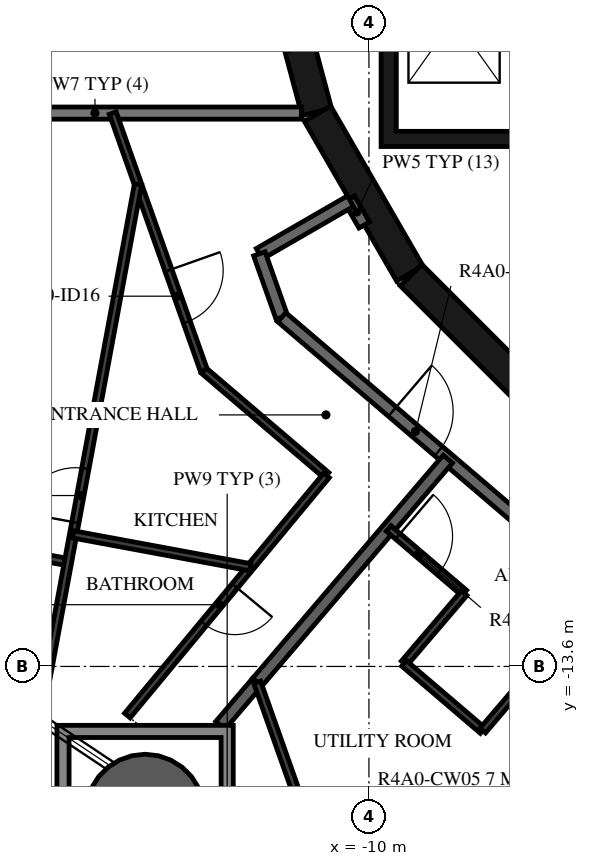
"""IFC4 building model, lengths in metres.
Left out: names, types, materials, properties, quantities, classifications, styles, units other than length and angle.
Written with IfcOpenShell. Run it as: python <this file> out.ifc"""

import sys

from ifc_helpers import new_model, si_unit, direction, frame, frame_2d, origin, origin_2d, place, context, subcontext, project, spatial, polyline, rectangle, hollow_circle, outline, extrude, element, fill, save


model = new_model("IFC4")
c1 = context("Model", 3, precision=1e-05, world=origin(), true_north=direction((0.0, 1.0)))
c2 = subcontext(c1, "Body", "Model", "MODEL_VIEW")
j1 = project(units=[si_unit("LENGTHUNIT", "METRE"), si_unit("PLANEANGLEUNIT", "RADIAN")], contexts=[c1])
p1 = place(None, origin())
s1 = spatial("IfcSite", under=j1, at=p1, CompositionType="ELEMENT")
p2 = place(p1, origin())
s2 = spatial("IfcBuilding", under=s1, at=p2, CompositionType="ELEMENT")
p3 = place(p2, frame((0.0, 0.0, 158.7)))
s3 = spatial("IfcBuildingStorey", under=s2, at=p3, CompositionType="ELEMENT", Elevation=158.7)
p4 = place(p3, frame((-13.681, -16.019, -0.38), z_axis=(0.0, 0.0, 1.0), x_axis=(1.0, 0.0, 0.0)))
e1 = element("IfcColumn", 1, at=p4, inside=s3, PredefinedType="COLUMN", context=c2, shape_type="SweptSolid", body=[
    extrude(hollow_circle(Radius=0.975, WallThickness=0.045, at=origin_2d()), origin(), (0.0, 0.0, 1.0), 3.5),
])
p5 = place(p3, frame((-11.643, -1.55, 0.0), z_axis=(0.0, 0.0, 1.0), x_axis=(0.258734743916, -0.965948410781, 0.0)))
e2 = element("IfcWall", 2, at=p5, inside=s3, PredefinedType="SHEAR", context=c2, shape_type="SweptSolid", body=[
    extrude(rectangle(XDim=3.033, YDim=0.5, at=frame_2d((1.516, 0.0))), origin(), (0.0, 0.0, 1.0), 3.12),
])
p6 = place(p5, frame((1.066, 0.0, 0.0)))
e3 = element("IfcOpeningElement", 3, at=p6, cuts=e2, PredefinedType="OPENING", context=c2, shape_type="SweptSolid", body=[
    extrude(rectangle(XDim=0.9, YDim=2.1, at=frame_2d((0.45, 1.05))), frame((0.0, 0.26, 0.0), z_axis=(0.0, -1.0, 0.0), x_axis=(1.0, 0.0, 0.0)), (0.0, 0.0, 1.0), 0.52),
])
p7 = place(p3, frame((-10.845, -4.51, 0.0), z_axis=(0.0, 0.0, 1.0), x_axis=(0.500087131594, -0.865975092491, 0.0)))
e4 = element("IfcWall", 4, at=p7, inside=s3, PredefinedType="SHEAR", context=c2, shape_type="SweptSolid", body=[
    extrude(rectangle(XDim=3.033, YDim=0.5, at=frame_2d((1.516, 0.0))), origin(), (0.0, 0.0, 1.0), 3.12),
])
p8 = place(p3, frame((-9.308, -7.164, 0.0), z_axis=(0.0, 0.0, 1.0), x_axis=(0.707106781187, -0.707106781187, 0.0)))
e5 = element("IfcWall", 5, at=p8, inside=s3, PredefinedType="SHEAR", context=c2, shape_type="SweptSolid", body=[
    extrude(rectangle(XDim=3.032, YDim=0.5, at=frame_2d((1.516, 0.0))), origin(), (0.0, 0.0, 1.0), 3.12),
])
p9 = place(p3, origin())
e6 = element("IfcWall", 6, at=p9, inside=s3, PredefinedType="SHEAR", context=c2, shape_type="SweptSolid", body=[
    extrude(outline(polyline([(9.8, -5.05), (9.8, -4.8), (9.8, -1.9), (9.55, -1.9), (9.55, -4.8), (7.65, -4.8), (7.65, -1.9), (7.4, -1.9), (7.4, -4.8), (5.5, -4.8), (5.5, -1.9), (5.25, -1.9), (5.25, -4.8), (3.35, -4.8), (3.35, -1.9), (3.1, -1.9), (3.1, -4.8), (1.2, -4.8), (1.2, -1.9), (0.95, -1.9), (0.95, -4.8), (-0.95, -4.8), (-0.95, -1.9), (-1.2, -1.9), (-1.2, -4.8), (-3.1, -4.8), (-3.1, -1.9), (-3.35, -1.9), (-3.35, -4.8), (-5.25, -4.8), (-5.25, -1.9), (-5.5, -1.9), (-5.5, -4.8), (-7.4, -4.8), (-7.4, -1.9), (-7.65, -1.9), (-7.65, -4.8), (-9.55, -4.8), (-9.55, -1.9), (-9.8, -1.9), (-9.8, -4.8), (-9.8, -5.05), (9.8, -5.05)])), origin(), (0.0, 0.0, 1.0), 3.12),
])
p10 = place(p3, frame((-10.323, -5.914, 0.0), z_axis=(0.0, 0.0, 1.0), x_axis=(0.500137201729, -0.865946175837, 0.0)))
e7 = element("IfcWall", 7, at=p10, inside=s3, PredefinedType="STANDARD", context=c2, shape_type="SweptSolid", body=[
    extrude(rectangle(XDim=0.492, YDim=0.2, at=frame_2d((0.246, 0.0))), origin(), (0.0, 0.0, 1.0), 3.12),
])
p11 = place(p3, frame((-10.303, -5.949, 0.0), z_axis=(0.0, 0.0, 1.0), x_axis=(-0.866021168401, -0.500007335828, 0.0)))
e8 = element("IfcWall", 8, at=p11, inside=s3, PredefinedType="STANDARD", context=c2, shape_type="SweptSolid", body=[
    extrude(rectangle(XDim=1.731, YDim=0.2, at=frame_2d((0.865, 0.0))), origin(), (0.0, 0.0, 1.0), 3.12),
])
p12 = place(p3, frame((-11.802, -6.814, 0.0), z_axis=(0.0, 0.0, 1.0), x_axis=(0.333904297771, -0.942606980629, 0.0)))
e9 = element("IfcWall", 9, at=p12, inside=s3, PredefinedType="STANDARD", context=c2, shape_type="SweptSolid", body=[
    extrude(rectangle(XDim=1.107, YDim=0.2, at=frame_2d((0.553, 0.0))), origin(), (0.0, 0.0, 1.0), 3.12),
])
p13 = place(p3, frame((-11.433, -7.858, 0.0), z_axis=(0.0, 0.0, 1.0), x_axis=(0.760412154545, -0.649440801937, 0.0)))
e10 = element("IfcWall", 10, at=p13, inside=s3, PredefinedType="STANDARD", context=c2, shape_type="SweptSolid", body=[
    extrude(rectangle(XDim=7.181, YDim=0.2, at=frame_2d((3.59, 0.0))), origin(), (0.0, 0.0, 1.0), 3.12),
])
p14 = place(p13, frame((2.39, 0.0, 0.0)))
e11 = element("IfcOpeningElement", 11, at=p14, cuts=e10, PredefinedType="OPENING", context=c2, shape_type="SweptSolid", body=[
    extrude(rectangle(XDim=1.0, YDim=2.1, at=frame_2d((0.5, 1.05))), frame((0.0, 0.11, 0.0), z_axis=(0.0, -1.0, 0.0), x_axis=(1.0, 0.0, 0.0)), (0.0, 0.0, 1.0), 0.22),
])
p15 = place(p3, frame((-17.9, -4.5, 0.0), z_axis=(0.0, 0.0, 1.0), x_axis=(1.0, 0.0, 0.0)))
e12 = element("IfcWall", 12, at=p15, inside=s3, PredefinedType="STANDARD", context=c2, shape_type="SweptSolid", body=[
    extrude(rectangle(XDim=6.789, YDim=0.2, at=frame_2d((3.394, 0.0))), origin(), (0.0, 0.0, 1.0), 3.12),
])
p16 = place(p3, frame((-11.838, -13.86, 0.0), z_axis=(0.0, 0.0, 1.0), x_axis=(0.64944503311, 0.760408540831, 0.0)))
e13 = element("IfcWall", 13, at=p16, inside=s3, PredefinedType="STANDARD", context=c2, shape_type="SweptSolid", body=[
    extrude(rectangle(XDim=4.827, YDim=0.2, at=frame_2d((2.414, 0.0))), origin(), (0.0, 0.0, 1.0), 3.12),
])
p17 = place(p3, frame((-12.443, -14.569, 0.0), z_axis=(0.0, 0.0, 1.0), x_axis=(0.649517408851, 0.760346720648, 0.0)))
e14 = element("IfcWall", 14, at=p17, inside=s3, PredefinedType="STANDARD", context=c2, shape_type="SweptSolid", body=[
    extrude(rectangle(XDim=0.932, YDim=0.2, at=frame_2d((0.466, 0.0))), origin(), (0.0, 0.0, 1.0), 3.12),
])
p18 = place(p3, frame((-14.213, -4.5, 0.0), z_axis=(0.0, 0.0, 1.0), x_axis=(0.333802904542, -0.942642891513, 0.0)))
e15 = element("IfcWall", 15, at=p18, inside=s3, PredefinedType="PARTITIONING", context=c2, shape_type="SweptSolid", body=[
    extrude(rectangle(XDim=4.495, YDim=0.12, at=frame_2d((2.248, 0.0))), origin(), (0.0, 0.0, 1.0), 3.12),
])
p19 = place(p18, frame((2.744, 0.0, 0.0)))
e16 = element("IfcOpeningElement", 16, at=p19, cuts=e15, PredefinedType="OPENING", context=c2, shape_type="SweptSolid", body=[
    extrude(rectangle(XDim=0.9, YDim=2.1, at=frame_2d((0.45, 1.05))), frame((0.0, 0.07, 0.0), z_axis=(0.0, -1.0, 0.0), x_axis=(1.0, 0.0, 0.0)), (0.0, 0.0, 1.0), 0.14),
])
p20 = place(p3, frame((-12.713, -8.737, 0.0), z_axis=(0.0, 0.0, 1.0), x_axis=(0.760400223405, -0.649454771517, 0.0)))
e17 = element("IfcWall", 17, at=p20, inside=s3, PredefinedType="PARTITIONING", context=c2, shape_type="SweptSolid", body=[
    extrude(rectangle(XDim=2.649, YDim=0.12, at=frame_2d((1.325, 0.0))), origin(), (0.0, 0.0, 1.0), 3.12),
])
p21 = place(p3, frame((-10.698, -10.458, 0.0), z_axis=(0.0, 0.0, 1.0), x_axis=(-0.63830561059, -0.769783052223, 0.0)))
e18 = element("IfcWall", 18, at=p21, inside=s3, PredefinedType="PARTITIONING", context=c2, shape_type="SweptSolid", body=[
    extrude(rectangle(XDim=5.131, YDim=0.12, at=frame_2d((2.565, 0.0))), origin(), (0.0, 0.0, 1.0), 3.12),
])
p22 = place(p21, frame((2.363, 0.0, 0.0)))
e19 = element("IfcOpeningElement", 19, at=p22, cuts=e18, PredefinedType="OPENING", context=c2, shape_type="SweptSolid", body=[
    extrude(rectangle(XDim=0.8, YDim=2.1, at=frame_2d((0.4, 1.05))), frame((0.0, 0.07, 0.0), z_axis=(0.0, -1.0, 0.0), x_axis=(1.0, 0.0, 0.0)), (0.0, 0.0, 1.0), 0.14),
])
p23 = place(p3, frame((-20.849, -10.792, 0.0), z_axis=(0.0, 0.0, 1.0), x_axis=(0.983251500113, -0.182253909494, 0.0)))
e20 = element("IfcWall", 20, at=p23, inside=s3, PredefinedType="PARTITIONING", context=c2, shape_type="SweptSolid", body=[
    extrude(rectangle(XDim=6.0, YDim=0.12, at=frame_2d((3.0, 0.0))), origin(), (0.0, 0.0, 1.0), 2.73),
])
p24 = place(p23, frame((0.2, 0.0, 0.0)))
e21 = element("IfcOpeningElement", 21, at=p24, cuts=e20, PredefinedType="OPENING", context=c2, shape_type="SweptSolid", body=[
    extrude(rectangle(XDim=0.9, YDim=2.1, at=frame_2d((0.45, 1.05))), frame((0.0, 0.07, 0.0), z_axis=(0.0, -1.0, 0.0), x_axis=(1.0, 0.0, 0.0)), (0.0, 0.0, 1.0), 0.14),
])
p25 = place(p3, frame((-15.554, -15.149, 0.0), z_axis=(0.0, 0.0, 1.0), x_axis=(0.182237116667, 0.983254612656, 0.0)))
e22 = element("IfcWall", 22, at=p25, inside=s3, PredefinedType="PARTITIONING", context=c2, shape_type="SweptSolid", body=[
    extrude(rectangle(XDim=9.638, YDim=0.12, at=frame_2d((4.819, 0.0))), origin(), (0.0, 0.0, 1.0), 3.12),
])
p26 = place(p25, frame((3.984, 0.0, 0.0)))
e23 = element("IfcOpeningElement", 23, at=p26, cuts=e22, PredefinedType="OPENING", context=c2, shape_type="SweptSolid", body=[
    extrude(rectangle(XDim=0.9, YDim=2.1, at=frame_2d((0.45, 1.05))), frame((0.0, 0.07, 0.0), z_axis=(0.0, -1.0, 0.0), x_axis=(1.0, 0.0, 0.0)), (0.0, 0.0, 1.0), 0.14),
])
p27 = place(p3, frame((-14.865, -11.428, 0.0), z_axis=(0.0, 0.0, 1.0), x_axis=(0.983255224962, -0.182233812955, 0.0)))
e24 = element("IfcWall", 24, at=p27, inside=s3, PredefinedType="PARTITIONING", context=c2, shape_type="SweptSolid", body=[
    extrude(rectangle(XDim=2.963, YDim=0.12, at=frame_2d((1.482, 0.0))), origin(), (0.0, 0.0, 1.0), 3.12),
])
p28 = place(p3, frame((-9.677, -11.33, 0.0), z_axis=(0.0, 0.0, 1.0), x_axis=(0.760372142735, -0.649487647729, 0.0)))
e25 = element("IfcWall", 25, at=p28, inside=s3, PredefinedType="PARTITIONING", context=c2, shape_type="SweptSolid", body=[
    extrude(rectangle(XDim=1.636, YDim=0.12, at=frame_2d((0.818, 0.0))), origin(), (0.0, 0.0, 1.0), 3.12),
])
p29 = place(p28, frame((0.2, 0.0, 0.0)))
e26 = element("IfcOpeningElement", 26, at=p29, cuts=e25, PredefinedType="OPENING", context=c2, shape_type="SweptSolid", body=[
    extrude(rectangle(XDim=0.9, YDim=2.1, at=frame_2d((0.45, 1.05))), frame((0.0, 0.07, 0.0), z_axis=(0.0, -1.0, 0.0), x_axis=(1.0, 0.0, 0.0)), (0.0, 0.0, 1.0), 0.14),
])
p30 = place(p3, frame((-8.433, -12.393, 0.0), z_axis=(0.0, 0.0, 1.0), x_axis=(-0.649443355674, -0.760409973482, 0.0)))
e27 = element("IfcWall", 27, at=p30, inside=s3, PredefinedType="PARTITIONING", context=c2, shape_type="SweptSolid", body=[
    extrude(rectangle(XDim=1.522, YDim=0.12, at=frame_2d((0.761, 0.0))), origin(), (0.0, 0.0, 1.0), 3.12),
])
p31 = place(p3, frame((-9.422, -13.55, 0.0), z_axis=(0.0, 0.0, 1.0), x_axis=(0.760431300628, -0.649418383652, 0.0)))
e28 = element("IfcWall", 28, at=p31, inside=s3, PredefinedType="PARTITIONING", context=c2, shape_type="SweptSolid", body=[
    extrude(rectangle(XDim=1.7, YDim=0.12, at=frame_2d((0.85, 0.0))), origin(), (0.0, 0.0, 1.0), 3.12),
])
p32 = place(p3, frame((-8.129, -14.654, 0.0), z_axis=(0.0, 0.0, 1.0), x_axis=(0.649443355674, 0.760409973482, 0.0)))
e29 = element("IfcWall", 29, at=p32, inside=s3, PredefinedType="PARTITIONING", context=c2, shape_type="SweptSolid", body=[
    extrude(rectangle(XDim=1.522, YDim=0.12, at=frame_2d((0.761, 0.0))), origin(), (0.0, 0.0, 1.0), 3.12),
])
p33 = place(p3, frame((-9.895, -19.346, 0.0), z_axis=(0.0, 0.0, 1.0), x_axis=(-0.333781129158, 0.942650602195, 0.0)))
e30 = element("IfcWall", 30, at=p33, inside=s3, PredefinedType="PARTITIONING", context=c2, shape_type="SweptSolid", body=[
    extrude(rectangle(XDim=5.819, YDim=0.12, at=frame_2d((2.91, 0.0))), origin(), (0.0, 0.0, 1.0), 3.12),
])
p34 = place(p33, frame((0.2, 0.0, 0.0)))
e31 = element("IfcOpeningElement", 31, at=p34, cuts=e30, PredefinedType="OPENING", context=c2, shape_type="SweptSolid", body=[
    extrude(rectangle(XDim=0.9, YDim=2.1, at=frame_2d((0.45, 1.05))), frame((0.0, 0.07, 0.0), z_axis=(0.0, -1.0, 0.0), x_axis=(1.0, 0.0, 0.0)), (0.0, 0.0, 1.0), 0.14),
])
p35 = place(p3, origin())
e32 = element("IfcWall", 32, at=p35, inside=s3, PredefinedType="STANDARD", context=c2, shape_type="SweptSolid", body=[
    extrude(outline(polyline([(-12.231, -14.569), (-12.231, -17.469), (-15.131, -17.469), (-15.131, -14.569), (-12.231, -14.569)]), holes=[polyline([(-14.931, -17.269), (-12.431, -17.269), (-12.431, -14.769), (-14.931, -14.769), (-14.931, -17.269)])]), origin(), (0.0, 0.0, 1.0), 3.12),
])
p36 = place(p14, origin())
e33 = element("IfcDoor", 33, at=p36, inside=s3, OperationType="SINGLE_SWING_RIGHT", PredefinedType="DOOR", context=c2, shape_type="SweptSolid", body=[
    extrude(rectangle(XDim=1.0, YDim=2.1, at=frame_2d((0.5, 1.05))), frame((0.0, 0.025, 0.0), z_axis=(0.0, -1.0, 0.0), x_axis=(1.0, 0.0, 0.0)), (0.0, 0.0, 1.0), 0.05),
])
fill(e11, e33)
p37 = place(p19, origin())
e34 = element("IfcDoor", 34, at=p37, inside=s3, OperationType="SINGLE_SWING_RIGHT", PredefinedType="DOOR", context=c2, shape_type="SweptSolid", body=[
    extrude(rectangle(XDim=0.9, YDim=2.1, at=frame_2d((0.45, 1.05))), frame((0.0, 0.025, 0.0), z_axis=(0.0, -1.0, 0.0), x_axis=(1.0, 0.0, 0.0)), (0.0, 0.0, 1.0), 0.05),
])
fill(e16, e34)
p38 = place(p22, origin())
e35 = element("IfcDoor", 35, at=p38, inside=s3, OperationType="SINGLE_SWING_RIGHT", PredefinedType="DOOR", context=c2, shape_type="SweptSolid", body=[
    extrude(rectangle(XDim=0.8, YDim=2.1, at=frame_2d((0.4, 1.05))), frame((0.0, 0.025, 0.0), z_axis=(0.0, -1.0, 0.0), x_axis=(1.0, 0.0, 0.0)), (0.0, 0.0, 1.0), 0.05),
])
fill(e19, e35)
p39 = place(p26, origin())
e36 = element("IfcDoor", 36, at=p39, inside=s3, OperationType="SINGLE_SWING_RIGHT", PredefinedType="DOOR", context=c2, shape_type="SweptSolid", body=[
    extrude(rectangle(XDim=0.9, YDim=2.1, at=frame_2d((0.45, 1.05))), frame((0.0, 0.025, 0.0), z_axis=(0.0, -1.0, 0.0), x_axis=(1.0, 0.0, 0.0)), (0.0, 0.0, 1.0), 0.05),
])
fill(e23, e36)
p40 = place(p29, origin())
e37 = element("IfcDoor", 37, at=p40, inside=s3, OperationType="SINGLE_SWING_LEFT", PredefinedType="DOOR", context=c2, shape_type="SweptSolid", body=[
    extrude(rectangle(XDim=0.9, YDim=2.1, at=frame_2d((0.45, 1.05))), frame((0.0, 0.025, 0.0), z_axis=(0.0, -1.0, 0.0), x_axis=(1.0, 0.0, 0.0)), (0.0, 0.0, 1.0), 0.05),
])
fill(e26, e37)
save(model, sys.argv[1])
